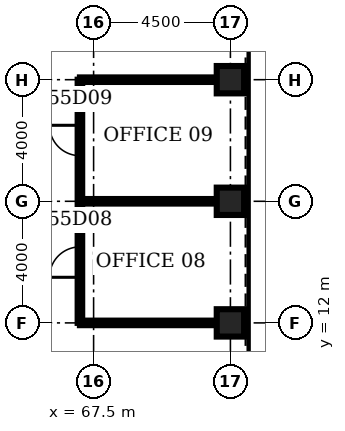
"""IFC4 building model, lengths in metres.
Left out: names, types, materials, properties, quantities, classifications, styles, units other than length and angle.
Written with IfcOpenShell. Run it as: python <this file> out.ifc"""

import sys

from ifc_helpers import new_model, si_unit, direction, frame, frame_2d, origin, origin_2d, place, context, subcontext, project, spatial, rectangle, hollow_rectangle, extrude, element, fill, save


model = new_model("IFC4")
c1 = context("Model", 3, precision=1e-05, world=origin(), true_north=direction((0.0, 1.0)))
c2 = subcontext(c1, "Body", "Model", "MODEL_VIEW")
j1 = project(units=[si_unit("LENGTHUNIT", "METRE"), si_unit("PLANEANGLEUNIT", "RADIAN")], contexts=[c1])
p1 = place(None, origin())
s1 = spatial("IfcSite", under=j1, at=p1, CompositionType="ELEMENT")
p2 = place(p1, origin())
s2 = spatial("IfcBuilding", under=s1, at=p2, CompositionType="ELEMENT")
p3 = place(p2, frame((0.0, 0.0, 244.6)))
s3 = spatial("IfcBuildingStorey", under=s2, at=p3, CompositionType="ELEMENT", Elevation=244.6)
for number, where, z_axis, x_axis in (
    (1, (72.0, 12.0, 0.0), (0.0, 0.0, 1.0), (1.0, 0.0, 0.0)),
    (2, (72.0, 16.0, 0.0), (0.0, 0.0, 1.0), (1.0, 0.0, 0.0)),
    (3, (72.0, 20.0, 0.0), (0.0, 0.0, 1.0), (1.0, 0.0, 0.0)),
):
    element("IfcColumn", number, at=place(p3, frame(where, z_axis=z_axis, x_axis=x_axis)), inside=s3, PredefinedType="COLUMN", context=c2, shape_type="SweptSolid", body=[
        extrude(hollow_rectangle(XDim=0.9, YDim=0.9, WallThickness=0.08, at=origin_2d()), origin(), (0.0, 0.0, 1.0), 4.2),
    ])
for number, where, z_axis, x_axis in (
    (4, (67.05, 12.0, 0.0), (0.0, 0.0, 1.0), (1.0, 0.0, 0.0)),
    (5, (67.05, 16.0, 0.0), (0.0, 0.0, 1.0), (1.0, 0.0, 0.0)),
    (6, (67.05, 20.0, 0.0), (0.0, 0.0, 1.0), (1.0, 0.0, 0.0)),
):
    element("IfcWall", number, at=place(p3, frame(where, z_axis=z_axis, x_axis=x_axis)), inside=s3, PredefinedType="PARTITIONING", context=c2, shape_type="SweptSolid", body=[
        extrude(rectangle(XDim=4.5, YDim=0.15, at=frame_2d((2.25, 0.0))), origin(), (0.0, 0.0, 1.0), 3.0),
    ])
p4 = place(p3, frame((67.05, 12.0, 0.0), z_axis=(0.0, 0.0, 1.0), x_axis=(0.0, 1.0, 0.0)))
e7 = element("IfcWall", 7, at=p4, inside=s3, PredefinedType="PARTITIONING", context=c2, shape_type="SweptSolid", body=[
    extrude(rectangle(XDim=8.0, YDim=0.15, at=frame_2d((4.0, 0.0))), origin(), (0.0, 0.0, 1.0), 3.0),
])
p5 = place(p4, frame((1.5, 0.0, 0.0)))
e8 = element("IfcOpeningElement", 8, at=p5, cuts=e7, PredefinedType="OPENING", context=c2, shape_type="SweptSolid", body=[
    extrude(rectangle(XDim=1.0, YDim=2.1, at=frame_2d((0.5, 1.05))), frame((0.0, 0.085, 0.0), z_axis=(0.0, -1.0, 0.0), x_axis=(1.0, 0.0, 0.0)), (0.0, 0.0, 1.0), 0.17),
])
p6 = place(p4, frame((5.5, 0.0, 0.0)))
e9 = element("IfcOpeningElement", 9, at=p6, cuts=e7, PredefinedType="OPENING", context=c2, shape_type="SweptSolid", body=[
    extrude(rectangle(XDim=1.0, YDim=2.1, at=frame_2d((0.5, 1.05))), frame((0.0, 0.085, 0.0), z_axis=(0.0, -1.0, 0.0), x_axis=(1.0, 0.0, 0.0)), (0.0, 0.0, 1.0), 0.17),
])
p7 = place(p5, origin())
e10 = element("IfcDoor", 10, at=p7, inside=s3, OperationType="SINGLE_SWING_LEFT", PredefinedType="DOOR", context=c2, shape_type="SweptSolid", body=[
    extrude(rectangle(XDim=1.0, YDim=2.1, at=frame_2d((0.5, 1.05))), frame((0.0, 0.025, 0.0), z_axis=(0.0, -1.0, 0.0), x_axis=(1.0, 0.0, 0.0)), (0.0, 0.0, 1.0), 0.05),
])
fill(e8, e10)
p8 = place(p6, origin())
e11 = element("IfcDoor", 11, at=p8, inside=s3, OperationType="SINGLE_SWING_RIGHT", PredefinedType="DOOR", context=c2, shape_type="SweptSolid", body=[
    extrude(rectangle(XDim=1.0, YDim=2.1, at=frame_2d((0.5, 1.05))), frame((0.0, 0.025, 0.0), z_axis=(0.0, -1.0, 0.0), x_axis=(1.0, 0.0, 0.0)), (0.0, 0.0, 1.0), 0.05),
])
fill(e9, e11)
save(model, sys.argv[1])
